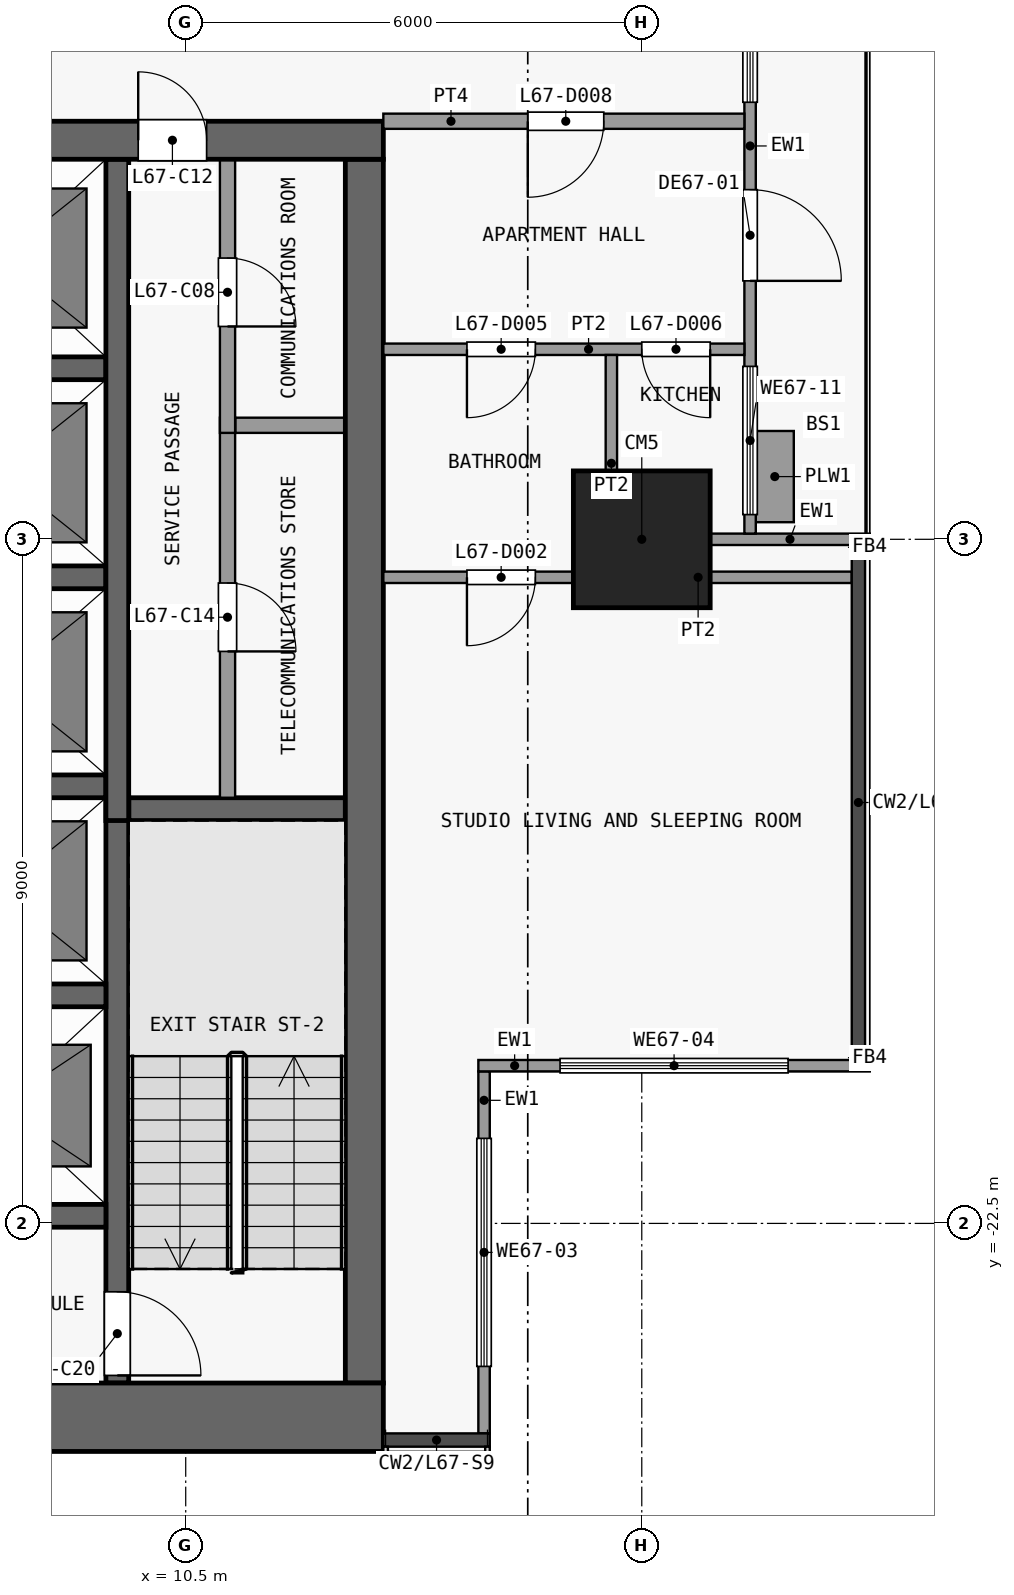
"""IFC4 building model, lengths in metres.
Left out: names, types, materials, properties, quantities, classifications, styles, units other than length and angle.
Written with IfcOpenShell. Run it as: python <this file> out.ifc"""

import sys

from ifc_helpers import new_model, si_unit, direction, frame, frame_2d, origin, origin_2d, place, context, subcontext, project, spatial, rectangle, extrude, element, fill, save


model = new_model("IFC4")
c1 = context("Model", 3, precision=1e-05, world=origin(), true_north=direction((0.0, 1.0)))
c2 = subcontext(c1, "Body", "Model", "MODEL_VIEW")
j1 = project(units=[si_unit("LENGTHUNIT", "METRE"), si_unit("PLANEANGLEUNIT", "RADIAN")], contexts=[c1])
p1 = place(None, origin())
s1 = spatial("IfcSite", under=j1, at=p1, CompositionType="ELEMENT")
p2 = place(p1, origin())
s2 = spatial("IfcBuilding", under=s1, at=p2, CompositionType="ELEMENT")
p3 = place(p2, frame((0.0, 0.0, 266.3)))
s3 = spatial("IfcBuildingStorey", under=s2, at=p3, CompositionType="ELEMENT", Elevation=266.3)
p4 = place(p3, frame((16.5, -13.5, 0.0), z_axis=(0.0, 0.0, 1.0), x_axis=(1.0, 0.0, 0.0)))
e1 = element("IfcColumn", 1, at=p4, inside=s3, PredefinedType="COLUMN", context=c2, shape_type="SweptSolid", body=[
    extrude(rectangle(XDim=1.8, YDim=1.8, at=origin_2d()), origin(), (0.0, 0.0, 1.0), 3.6),
])
p5 = place(p3, frame((-13.1, -25.05, 0.0), z_axis=(0.0, 0.0, 1.0), x_axis=(1.0, 0.0, 0.0)))
e2 = element("IfcWall", 2, at=p5, inside=s3, PredefinedType="SHEAR", context=c2, shape_type="SweptSolid", body=[
    extrude(rectangle(XDim=26.2, YDim=0.9, at=frame_2d((13.1, 0.0))), origin(), (0.0, 0.0, 1.0), 3.3),
])
p6 = place(p3, frame((-13.1, -8.25, 0.0), z_axis=(0.0, 0.0, 1.0), x_axis=(1.0, 0.0, 0.0)))
e3 = element("IfcWall", 3, at=p6, inside=s3, PredefinedType="SHEAR", context=c2, shape_type="SweptSolid", body=[
    extrude(rectangle(XDim=26.2, YDim=0.5, at=frame_2d((13.1, 0.0))), origin(), (0.0, 0.0, 1.0), 3.3),
])
p7 = place(p6, frame((7.4, 0.0, 0.0)))
e4 = element("IfcOpeningElement", 4, at=p7, cuts=e3, PredefinedType="OPENING", context=c2, shape_type="SweptSolid", body=[
    extrude(rectangle(XDim=1.8, YDim=2.1, at=frame_2d((0.9, 1.05))), frame((0.0, 0.26, 0.0), z_axis=(0.0, -1.0, 0.0), x_axis=(1.0, 0.0, 0.0)), (0.0, 0.0, 1.0), 0.52),
])
p8 = place(p6, frame((17.0, 0.0, 0.0)))
e5 = element("IfcOpeningElement", 5, at=p8, cuts=e3, PredefinedType="OPENING", context=c2, shape_type="SweptSolid", body=[
    extrude(rectangle(XDim=1.8, YDim=2.1, at=frame_2d((0.9, 1.05))), frame((0.0, 0.26, 0.0), z_axis=(0.0, -1.0, 0.0), x_axis=(1.0, 0.0, 0.0)), (0.0, 0.0, 1.0), 0.52),
])
p9 = place(p6, frame((2.325, 0.0, 0.0)))
e6 = element("IfcOpeningElement", 6, at=p9, cuts=e3, PredefinedType="OPENING", context=c2, shape_type="SweptSolid", body=[
    extrude(rectangle(XDim=0.9, YDim=2.1, at=frame_2d((0.45, 1.05))), frame((0.0, 0.26, 0.0), z_axis=(0.0, -1.0, 0.0), x_axis=(1.0, 0.0, 0.0)), (0.0, 0.0, 1.0), 0.52),
])
p10 = place(p6, frame((22.975, 0.0, 0.0)))
e7 = element("IfcOpeningElement", 7, at=p10, cuts=e3, PredefinedType="OPENING", context=c2, shape_type="SweptSolid", body=[
    extrude(rectangle(XDim=0.9, YDim=2.1, at=frame_2d((0.45, 1.05))), frame((0.0, 0.26, 0.0), z_axis=(0.0, -1.0, 0.0), x_axis=(1.0, 0.0, 0.0)), (0.0, 0.0, 1.0), 0.52),
])
p11 = place(p3, frame((12.85, -24.6, 0.0), z_axis=(0.0, 0.0, 1.0), x_axis=(0.0, 1.0, 0.0)))
e8 = element("IfcWall", 8, at=p11, inside=s3, PredefinedType="SHEAR", context=c2, shape_type="SweptSolid", body=[
    extrude(rectangle(XDim=16.1, YDim=0.5, at=frame_2d((8.05, 0.0))), origin(), (0.0, 0.0, 1.0), 3.3),
])
for number, where, z_axis, x_axis in (
    (9, (6.65, -22.4, 0.0), (0.0, 0.0, 1.0), (1.0, 0.0, 0.0)),
    (10, (6.65, -19.5, 0.0), (0.0, 0.0, 1.0), (1.0, 0.0, 0.0)),
):
    element("IfcWall", number, at=place(p3, frame(where, z_axis=z_axis, x_axis=x_axis)), inside=s3, PredefinedType="SHEAR", context=c2, shape_type="SweptSolid", body=[
        extrude(rectangle(XDim=2.8, YDim=0.3, at=frame_2d((1.4, 0.0))), origin(), (0.0, 0.0, 1.0), 3.3),
    ])
p12 = place(p3, frame((9.75, -17.05, 0.0), z_axis=(0.0, 0.0, 1.0), x_axis=(1.0, 0.0, 0.0)))
e11 = element("IfcWall", 11, at=p12, inside=s3, PredefinedType="SHEAR", context=c2, shape_type="SweptSolid", body=[
    extrude(rectangle(XDim=2.85, YDim=0.3, at=frame_2d((1.425, 0.0))), origin(), (0.0, 0.0, 1.0), 3.3),
])
for number, where, z_axis, x_axis in (
    (12, (6.65, -16.75, 0.0), (0.0, 0.0, 1.0), (1.0, 0.0, 0.0)),
    (13, (6.65, -14.0, 0.0), (0.0, 0.0, 1.0), (1.0, 0.0, 0.0)),
):
    element("IfcWall", number, at=place(p3, frame(where, z_axis=z_axis, x_axis=x_axis)), inside=s3, PredefinedType="SHEAR", context=c2, shape_type="SweptSolid", body=[
        extrude(rectangle(XDim=2.8, YDim=0.3, at=frame_2d((1.4, 0.0))), origin(), (0.0, 0.0, 1.0), 3.3),
    ])
p13 = place(p3, frame((11.15, -12.0, 0.0), z_axis=(0.0, 0.0, 1.0), x_axis=(1.0, 0.0, 0.0)))
e14 = element("IfcWall", 14, at=p13, inside=s3, PredefinedType="PARTITIONING", context=c2, shape_type="SweptSolid", body=[
    extrude(rectangle(XDim=1.45, YDim=0.2, at=frame_2d((0.725, 0.0))), origin(), (0.0, 0.0, 1.0), 3.3),
])
p14 = place(p3, frame((6.65, -11.25, 0.0), z_axis=(0.0, 0.0, 1.0), x_axis=(1.0, 0.0, 0.0)))
e15 = element("IfcWall", 15, at=p14, inside=s3, PredefinedType="SHEAR", context=c2, shape_type="SweptSolid", body=[
    extrude(rectangle(XDim=2.8, YDim=0.3, at=frame_2d((1.4, 0.0))), origin(), (0.0, 0.0, 1.0), 3.3),
])
p15 = place(p3, frame((9.6, -16.9, 0.0), z_axis=(0.0, 0.0, 1.0), x_axis=(0.0, -1.0, 0.0)))
e16 = element("IfcWall", 16, at=p15, inside=s3, PredefinedType="SHEAR", context=c2, shape_type="SweptSolid", body=[
    extrude(rectangle(XDim=7.7, YDim=0.3, at=frame_2d((3.85, 0.0))), origin(), (0.0, 0.0, 1.0), 3.3),
])
p16 = place(p15, frame((6.5, 0.0, 0.0)))
e17 = element("IfcOpeningElement", 17, at=p16, cuts=e16, PredefinedType="OPENING", context=c2, shape_type="SweptSolid", body=[
    extrude(rectangle(XDim=1.1, YDim=2.1, at=frame_2d((0.55, 1.05))), frame((0.0, 0.16, 0.0), z_axis=(0.0, -1.0, 0.0), x_axis=(1.0, 0.0, 0.0)), (0.0, 0.0, 1.0), 0.32),
])
p17 = place(p3, frame((9.6, -17.2, 0.0), z_axis=(0.0, 0.0, 1.0), x_axis=(0.0, 1.0, 0.0)))
e18 = element("IfcWall", 18, at=p17, inside=s3, PredefinedType="SHEAR", context=c2, shape_type="SweptSolid", body=[
    extrude(rectangle(XDim=8.7, YDim=0.3, at=frame_2d((4.35, 0.0))), origin(), (0.0, 0.0, 1.0), 3.3),
])
p18 = place(p3, frame((11.05, -11.9, 0.0), z_axis=(0.0, 0.0, 1.0), x_axis=(0.0, -1.0, 0.0)))
e19 = element("IfcWall", 19, at=p18, inside=s3, PredefinedType="PARTITIONING", context=c2, shape_type="SweptSolid", body=[
    extrude(rectangle(XDim=5.0, YDim=0.2, at=frame_2d((2.5, 0.0))), origin(), (0.0, 0.0, 1.0), 3.3),
])
p19 = place(p18, frame((2.175, 0.0, 0.0)))
e20 = element("IfcOpeningElement", 20, at=p19, cuts=e19, PredefinedType="OPENING", context=c2, shape_type="SweptSolid", body=[
    extrude(rectangle(XDim=0.9, YDim=2.1, at=frame_2d((0.45, 1.05))), frame((0.0, 0.11, 0.0), z_axis=(0.0, -1.0, 0.0), x_axis=(1.0, 0.0, 0.0)), (0.0, 0.0, 1.0), 0.22),
])
p20 = place(p3, frame((11.05, -8.5, 0.0), z_axis=(0.0, 0.0, 1.0), x_axis=(0.0, -1.0, 0.0)))
e21 = element("IfcWall", 21, at=p20, inside=s3, PredefinedType="PARTITIONING", context=c2, shape_type="SweptSolid", body=[
    extrude(rectangle(XDim=3.6, YDim=0.2, at=frame_2d((1.8, 0.0))), origin(), (0.0, 0.0, 1.0), 3.3),
])
p21 = place(p20, frame((1.3, 0.0, 0.0)))
e22 = element("IfcOpeningElement", 22, at=p21, cuts=e21, PredefinedType="OPENING", context=c2, shape_type="SweptSolid", body=[
    extrude(rectangle(XDim=0.9, YDim=2.1, at=frame_2d((0.45, 1.05))), frame((0.0, 0.11, 0.0), z_axis=(0.0, -1.0, 0.0), x_axis=(1.0, 0.0, 0.0)), (0.0, 0.0, 1.0), 0.22),
])
p22 = place(p3, frame((14.425, -20.5, 0.0), z_axis=(0.0, 0.0, 1.0), x_axis=(0.0, -1.0, 0.0)))
e23 = element("IfcWall", 23, at=p22, inside=s3, PredefinedType="SOLIDWALL", context=c2, shape_type="SweptSolid", body=[
    extrude(rectangle(XDim=4.762, YDim=0.15, at=frame_2d((2.381, 0.0))), origin(), (0.0, 0.0, 1.0), 3.3),
])
p23 = place(p22, frame((0.881, 0.0, 0.9)))
e24 = element("IfcOpeningElement", 24, at=p23, cuts=e23, PredefinedType="OPENING", context=c2, shape_type="SweptSolid", body=[
    extrude(rectangle(XDim=3.0, YDim=2.4, at=frame_2d((1.5, 1.2))), frame((0.0, 0.085, 0.0), z_axis=(0.0, -1.0, 0.0), x_axis=(1.0, 0.0, 0.0)), (0.0, 0.0, 1.0), 0.17),
])
p24 = place(p3, frame((19.5, -20.425, 0.0), z_axis=(0.0, 0.0, 1.0), x_axis=(-1.0, 0.0, 0.0)))
e25 = element("IfcWall", 25, at=p24, inside=s3, PredefinedType="SOLIDWALL", context=c2, shape_type="SweptSolid", body=[
    extrude(rectangle(XDim=5.15, YDim=0.15, at=frame_2d((2.575, 0.0))), origin(), (0.0, 0.0, 1.0), 3.3),
])
p25 = place(p24, frame((1.075, 0.0, 0.9)))
e26 = element("IfcOpeningElement", 26, at=p25, cuts=e25, PredefinedType="OPENING", context=c2, shape_type="SweptSolid", body=[
    extrude(rectangle(XDim=3.0, YDim=2.4, at=frame_2d((1.5, 1.2))), frame((0.0, 0.085, 0.0), z_axis=(0.0, -1.0, 0.0), x_axis=(1.0, 0.0, 0.0)), (0.0, 0.0, 1.0), 0.17),
])
p26 = place(p3, frame((17.4, -13.5, 0.0), z_axis=(0.0, 0.0, 1.0), x_axis=(1.0, 0.0, 0.0)))
e27 = element("IfcWall", 27, at=p26, inside=s3, PredefinedType="SOLIDWALL", context=c2, shape_type="SweptSolid", body=[
    extrude(rectangle(XDim=2.1, YDim=0.15, at=frame_2d((1.05, 0.0))), origin(), (0.0, 0.0, 1.0), 3.3),
])
p27 = place(p3, frame((17.925, -4.575, 0.0), z_axis=(0.0, 0.0, 1.0), x_axis=(0.0, -1.0, 0.0)))
e28 = element("IfcWall", 28, at=p27, inside=s3, PredefinedType="SOLIDWALL", context=c2, shape_type="SweptSolid", body=[
    extrude(rectangle(XDim=8.85, YDim=0.15, at=frame_2d((4.425, 0.0))), origin(), (0.0, 0.0, 1.0), 3.3),
])
p28 = place(p27, frame((4.325, 0.0, 0.0)))
e29 = element("IfcOpeningElement", 29, at=p28, cuts=e28, PredefinedType="OPENING", context=c2, shape_type="SweptSolid", body=[
    extrude(rectangle(XDim=1.2, YDim=2.4, at=frame_2d((0.6, 1.2))), frame((0.0, 0.085, 0.0), z_axis=(0.0, -1.0, 0.0), x_axis=(1.0, 0.0, 0.0)), (0.0, 0.0, 1.0), 0.17),
])
p29 = place(p27, frame((6.65, 0.0, 0.9)))
e30 = element("IfcOpeningElement", 30, at=p29, cuts=e28, PredefinedType="OPENING", context=c2, shape_type="SweptSolid", body=[
    extrude(rectangle(XDim=1.95, YDim=2.1, at=frame_2d((0.975, 1.05))), frame((0.0, 0.085, 0.0), z_axis=(0.0, -1.0, 0.0), x_axis=(1.0, 0.0, 0.0)), (0.0, 0.0, 1.0), 0.17),
])
p30 = place(p27, frame((0.662, 0.0, 0.9)))
e31 = element("IfcOpeningElement", 31, at=p30, cuts=e28, PredefinedType="OPENING", context=c2, shape_type="SweptSolid", body=[
    extrude(rectangle(XDim=2.513, YDim=2.1, at=frame_2d((1.256, 1.05))), frame((0.0, 0.085, 0.0), z_axis=(0.0, -1.0, 0.0), x_axis=(1.0, 0.0, 0.0)), (0.0, 0.0, 1.0), 0.17),
])
p31 = place(p3, frame((18.25, -13.275, 0.0), z_axis=(0.0, 0.0, 1.0), x_axis=(0.0, 1.0, 0.0)))
e32 = element("IfcWall", 32, at=p31, inside=s3, PredefinedType="USERDEFINED", context=c2, shape_type="SweptSolid", body=[
    extrude(rectangle(XDim=1.2, YDim=0.5, at=frame_2d((0.6, 0.0))), origin(), (0.0, 0.0, 1.0), 0.9),
])
p32 = place(p3, frame((13.1, -14.0, 0.0), z_axis=(0.0, 0.0, 1.0), x_axis=(1.0, 0.0, 0.0)))
e33 = element("IfcWall", 33, at=p32, inside=s3, PredefinedType="PARTITIONING", context=c2, shape_type="SweptSolid", body=[
    extrude(rectangle(XDim=6.162, YDim=0.15, at=frame_2d((3.081, 0.0))), origin(), (0.0, 0.0, 1.0), 3.3),
])
p33 = place(p32, frame((1.1, 0.0, 0.0)))
e34 = element("IfcOpeningElement", 34, at=p33, cuts=e33, PredefinedType="OPENING", context=c2, shape_type="SweptSolid", body=[
    extrude(rectangle(XDim=0.9, YDim=2.1, at=frame_2d((0.45, 1.05))), frame((0.0, 0.085, 0.0), z_axis=(0.0, -1.0, 0.0), x_axis=(1.0, 0.0, 0.0)), (0.0, 0.0, 1.0), 0.17),
])
p34 = place(p3, frame((13.1, -11.0, 0.0), z_axis=(0.0, 0.0, 1.0), x_axis=(1.0, 0.0, 0.0)))
e35 = element("IfcWall", 35, at=p34, inside=s3, PredefinedType="PARTITIONING", context=c2, shape_type="SweptSolid", body=[
    extrude(rectangle(XDim=4.75, YDim=0.15, at=frame_2d((2.375, 0.0))), origin(), (0.0, 0.0, 1.0), 3.3),
])
p35 = place(p34, frame((1.1, 0.0, 0.0)))
e36 = element("IfcOpeningElement", 36, at=p35, cuts=e35, PredefinedType="OPENING", context=c2, shape_type="SweptSolid", body=[
    extrude(rectangle(XDim=0.9, YDim=2.1, at=frame_2d((0.45, 1.05))), frame((0.0, 0.085, 0.0), z_axis=(0.0, -1.0, 0.0), x_axis=(1.0, 0.0, 0.0)), (0.0, 0.0, 1.0), 0.17),
])
p36 = place(p34, frame((3.4, 0.0, 0.0)))
e37 = element("IfcOpeningElement", 37, at=p36, cuts=e35, PredefinedType="OPENING", context=c2, shape_type="SweptSolid", body=[
    extrude(rectangle(XDim=0.9, YDim=2.1, at=frame_2d((0.45, 1.05))), frame((0.0, 0.085, 0.0), z_axis=(0.0, -1.0, 0.0), x_axis=(1.0, 0.0, 0.0)), (0.0, 0.0, 1.0), 0.17),
])
p37 = place(p3, frame((13.1, -8.0, 0.0), z_axis=(0.0, 0.0, 1.0), x_axis=(1.0, 0.0, 0.0)))
e38 = element("IfcWall", 38, at=p37, inside=s3, PredefinedType="PARTITIONING", context=c2, shape_type="SweptSolid", body=[
    extrude(rectangle(XDim=4.75, YDim=0.2, at=frame_2d((2.375, 0.0))), origin(), (0.0, 0.0, 1.0), 3.3),
])
p38 = place(p37, frame((1.9, 0.0, 0.0)))
e39 = element("IfcOpeningElement", 39, at=p38, cuts=e38, PredefinedType="OPENING", context=c2, shape_type="SweptSolid", body=[
    extrude(rectangle(XDim=1.0, YDim=2.1, at=frame_2d((0.5, 1.05))), frame((0.0, 0.11, 0.0), z_axis=(0.0, -1.0, 0.0), x_axis=(1.0, 0.0, 0.0)), (0.0, 0.0, 1.0), 0.22),
])
p39 = place(p3, frame((16.1, -13.925, 0.0), z_axis=(0.0, 0.0, 1.0), x_axis=(0.0, 1.0, 0.0)))
e40 = element("IfcWall", 40, at=p39, inside=s3, PredefinedType="PARTITIONING", context=c2, shape_type="SweptSolid", body=[
    extrude(rectangle(XDim=2.85, YDim=0.15, at=frame_2d((1.425, 0.0))), origin(), (0.0, 0.0, 1.0), 3.3),
])
p40 = place(p21, origin())
e41 = element("IfcDoor", 41, at=p40, inside=s3, OperationType="SINGLE_SWING_RIGHT", PredefinedType="DOOR", context=c2, shape_type="SweptSolid", body=[
    extrude(rectangle(XDim=0.9, YDim=2.1, at=frame_2d((0.45, 1.05))), frame((0.0, 0.025, 0.0), z_axis=(0.0, -1.0, 0.0), x_axis=(1.0, 0.0, 0.0)), (0.0, 0.0, 1.0), 0.05),
])
fill(e22, e41)
p41 = place(p10, origin())
e42 = element("IfcDoor", 42, at=p41, inside=s3, OperationType="SINGLE_SWING_LEFT", PredefinedType="DOOR", context=c2, shape_type="SweptSolid", body=[
    extrude(rectangle(XDim=0.9, YDim=2.1, at=frame_2d((0.45, 1.05))), frame((0.0, 0.025, 0.0), z_axis=(0.0, -1.0, 0.0), x_axis=(1.0, 0.0, 0.0)), (0.0, 0.0, 1.0), 0.05),
])
fill(e7, e42)
p42 = place(p19, origin())
e43 = element("IfcDoor", 43, at=p42, inside=s3, OperationType="SINGLE_SWING_RIGHT", PredefinedType="DOOR", context=c2, shape_type="SweptSolid", body=[
    extrude(rectangle(XDim=0.9, YDim=2.1, at=frame_2d((0.45, 1.05))), frame((0.0, 0.025, 0.0), z_axis=(0.0, -1.0, 0.0), x_axis=(1.0, 0.0, 0.0)), (0.0, 0.0, 1.0), 0.05),
])
fill(e20, e43)
p43 = place(p16, origin())
e44 = element("IfcDoor", 44, at=p43, inside=s3, OperationType="SINGLE_SWING_RIGHT", PredefinedType="DOOR", context=c2, shape_type="SweptSolid", body=[
    extrude(rectangle(XDim=1.1, YDim=2.1, at=frame_2d((0.55, 1.05))), frame((0.0, 0.025, 0.0), z_axis=(0.0, -1.0, 0.0), x_axis=(1.0, 0.0, 0.0)), (0.0, 0.0, 1.0), 0.05),
])
fill(e17, e44)
p44 = place(p23, origin())
e45 = element("IfcWindow", 45, at=p44, inside=s3, PartitioningType="SINGLE_PANEL", PredefinedType="WINDOW", context=c2, shape_type="SweptSolid", body=[
    extrude(rectangle(XDim=3.0, YDim=2.4, at=frame_2d((1.5, 1.2))), frame((0.0, 0.03, 0.0), z_axis=(0.0, -1.0, 0.0), x_axis=(1.0, 0.0, 0.0)), (0.0, 0.0, 1.0), 0.06),
])
fill(e24, e45)
p45 = place(p25, origin())
e46 = element("IfcWindow", 46, at=p45, inside=s3, PartitioningType="SINGLE_PANEL", PredefinedType="WINDOW", context=c2, shape_type="SweptSolid", body=[
    extrude(rectangle(XDim=3.0, YDim=2.4, at=frame_2d((1.5, 1.2))), frame((0.0, 0.03, 0.0), z_axis=(0.0, -1.0, 0.0), x_axis=(1.0, 0.0, 0.0)), (0.0, 0.0, 1.0), 0.06),
])
fill(e26, e46)
p46 = place(p28, origin())
e47 = element("IfcDoor", 47, at=p46, inside=s3, OperationType="SINGLE_SWING_RIGHT", PredefinedType="DOOR", context=c2, shape_type="SweptSolid", body=[
    extrude(rectangle(XDim=1.2, YDim=2.4, at=frame_2d((0.6, 1.2))), frame((0.0, 0.025, 0.0), z_axis=(0.0, -1.0, 0.0), x_axis=(1.0, 0.0, 0.0)), (0.0, 0.0, 1.0), 0.05),
])
fill(e29, e47)
p47 = place(p29, origin())
e48 = element("IfcWindow", 48, at=p47, inside=s3, PartitioningType="SINGLE_PANEL", PredefinedType="WINDOW", context=c2, shape_type="SweptSolid", body=[
    extrude(rectangle(XDim=1.95, YDim=2.1, at=frame_2d((0.975, 1.05))), frame((0.0, 0.03, 0.0), z_axis=(0.0, -1.0, 0.0), x_axis=(1.0, 0.0, 0.0)), (0.0, 0.0, 1.0), 0.06),
])
fill(e30, e48)
p48 = place(p30, origin())
e49 = element("IfcWindow", 49, at=p48, inside=s3, PartitioningType="SINGLE_PANEL", PredefinedType="WINDOW", context=c2, shape_type="SweptSolid", body=[
    extrude(rectangle(XDim=2.513, YDim=2.1, at=frame_2d((1.256, 1.05))), frame((0.0, 0.03, 0.0), z_axis=(0.0, -1.0, 0.0), x_axis=(1.0, 0.0, 0.0)), (0.0, 0.0, 1.0), 0.06),
])
fill(e31, e49)
p49 = place(p33, origin())
e50 = element("IfcDoor", 50, at=p49, inside=s3, OperationType="SINGLE_SWING_LEFT", PredefinedType="DOOR", context=c2, shape_type="SweptSolid", body=[
    extrude(rectangle(XDim=0.9, YDim=2.1, at=frame_2d((0.45, 1.05))), frame((0.0, 0.025, 0.0), z_axis=(0.0, -1.0, 0.0), x_axis=(1.0, 0.0, 0.0)), (0.0, 0.0, 1.0), 0.05),
])
fill(e34, e50)
p50 = place(p35, origin())
e51 = element("IfcDoor", 51, at=p50, inside=s3, OperationType="SINGLE_SWING_LEFT", PredefinedType="DOOR", context=c2, shape_type="SweptSolid", body=[
    extrude(rectangle(XDim=0.9, YDim=2.1, at=frame_2d((0.45, 1.05))), frame((0.0, 0.025, 0.0), z_axis=(0.0, -1.0, 0.0), x_axis=(1.0, 0.0, 0.0)), (0.0, 0.0, 1.0), 0.05),
])
fill(e36, e51)
p51 = place(p36, origin())
e52 = element("IfcDoor", 52, at=p51, inside=s3, OperationType="SINGLE_SWING_RIGHT", PredefinedType="DOOR", context=c2, shape_type="SweptSolid", body=[
    extrude(rectangle(XDim=0.9, YDim=2.1, at=frame_2d((0.45, 1.05))), frame((0.0, 0.025, 0.0), z_axis=(0.0, -1.0, 0.0), x_axis=(1.0, 0.0, 0.0)), (0.0, 0.0, 1.0), 0.05),
])
fill(e37, e52)
p52 = place(p38, origin())
e53 = element("IfcDoor", 53, at=p52, inside=s3, OperationType="SINGLE_SWING_LEFT", PredefinedType="DOOR", context=c2, shape_type="SweptSolid", body=[
    extrude(rectangle(XDim=1.0, YDim=2.1, at=frame_2d((0.5, 1.05))), frame((0.0, 0.025, 0.0), z_axis=(0.0, -1.0, 0.0), x_axis=(1.0, 0.0, 0.0)), (0.0, 0.0, 1.0), 0.05),
])
fill(e39, e53)
save(model, sys.argv[1])
